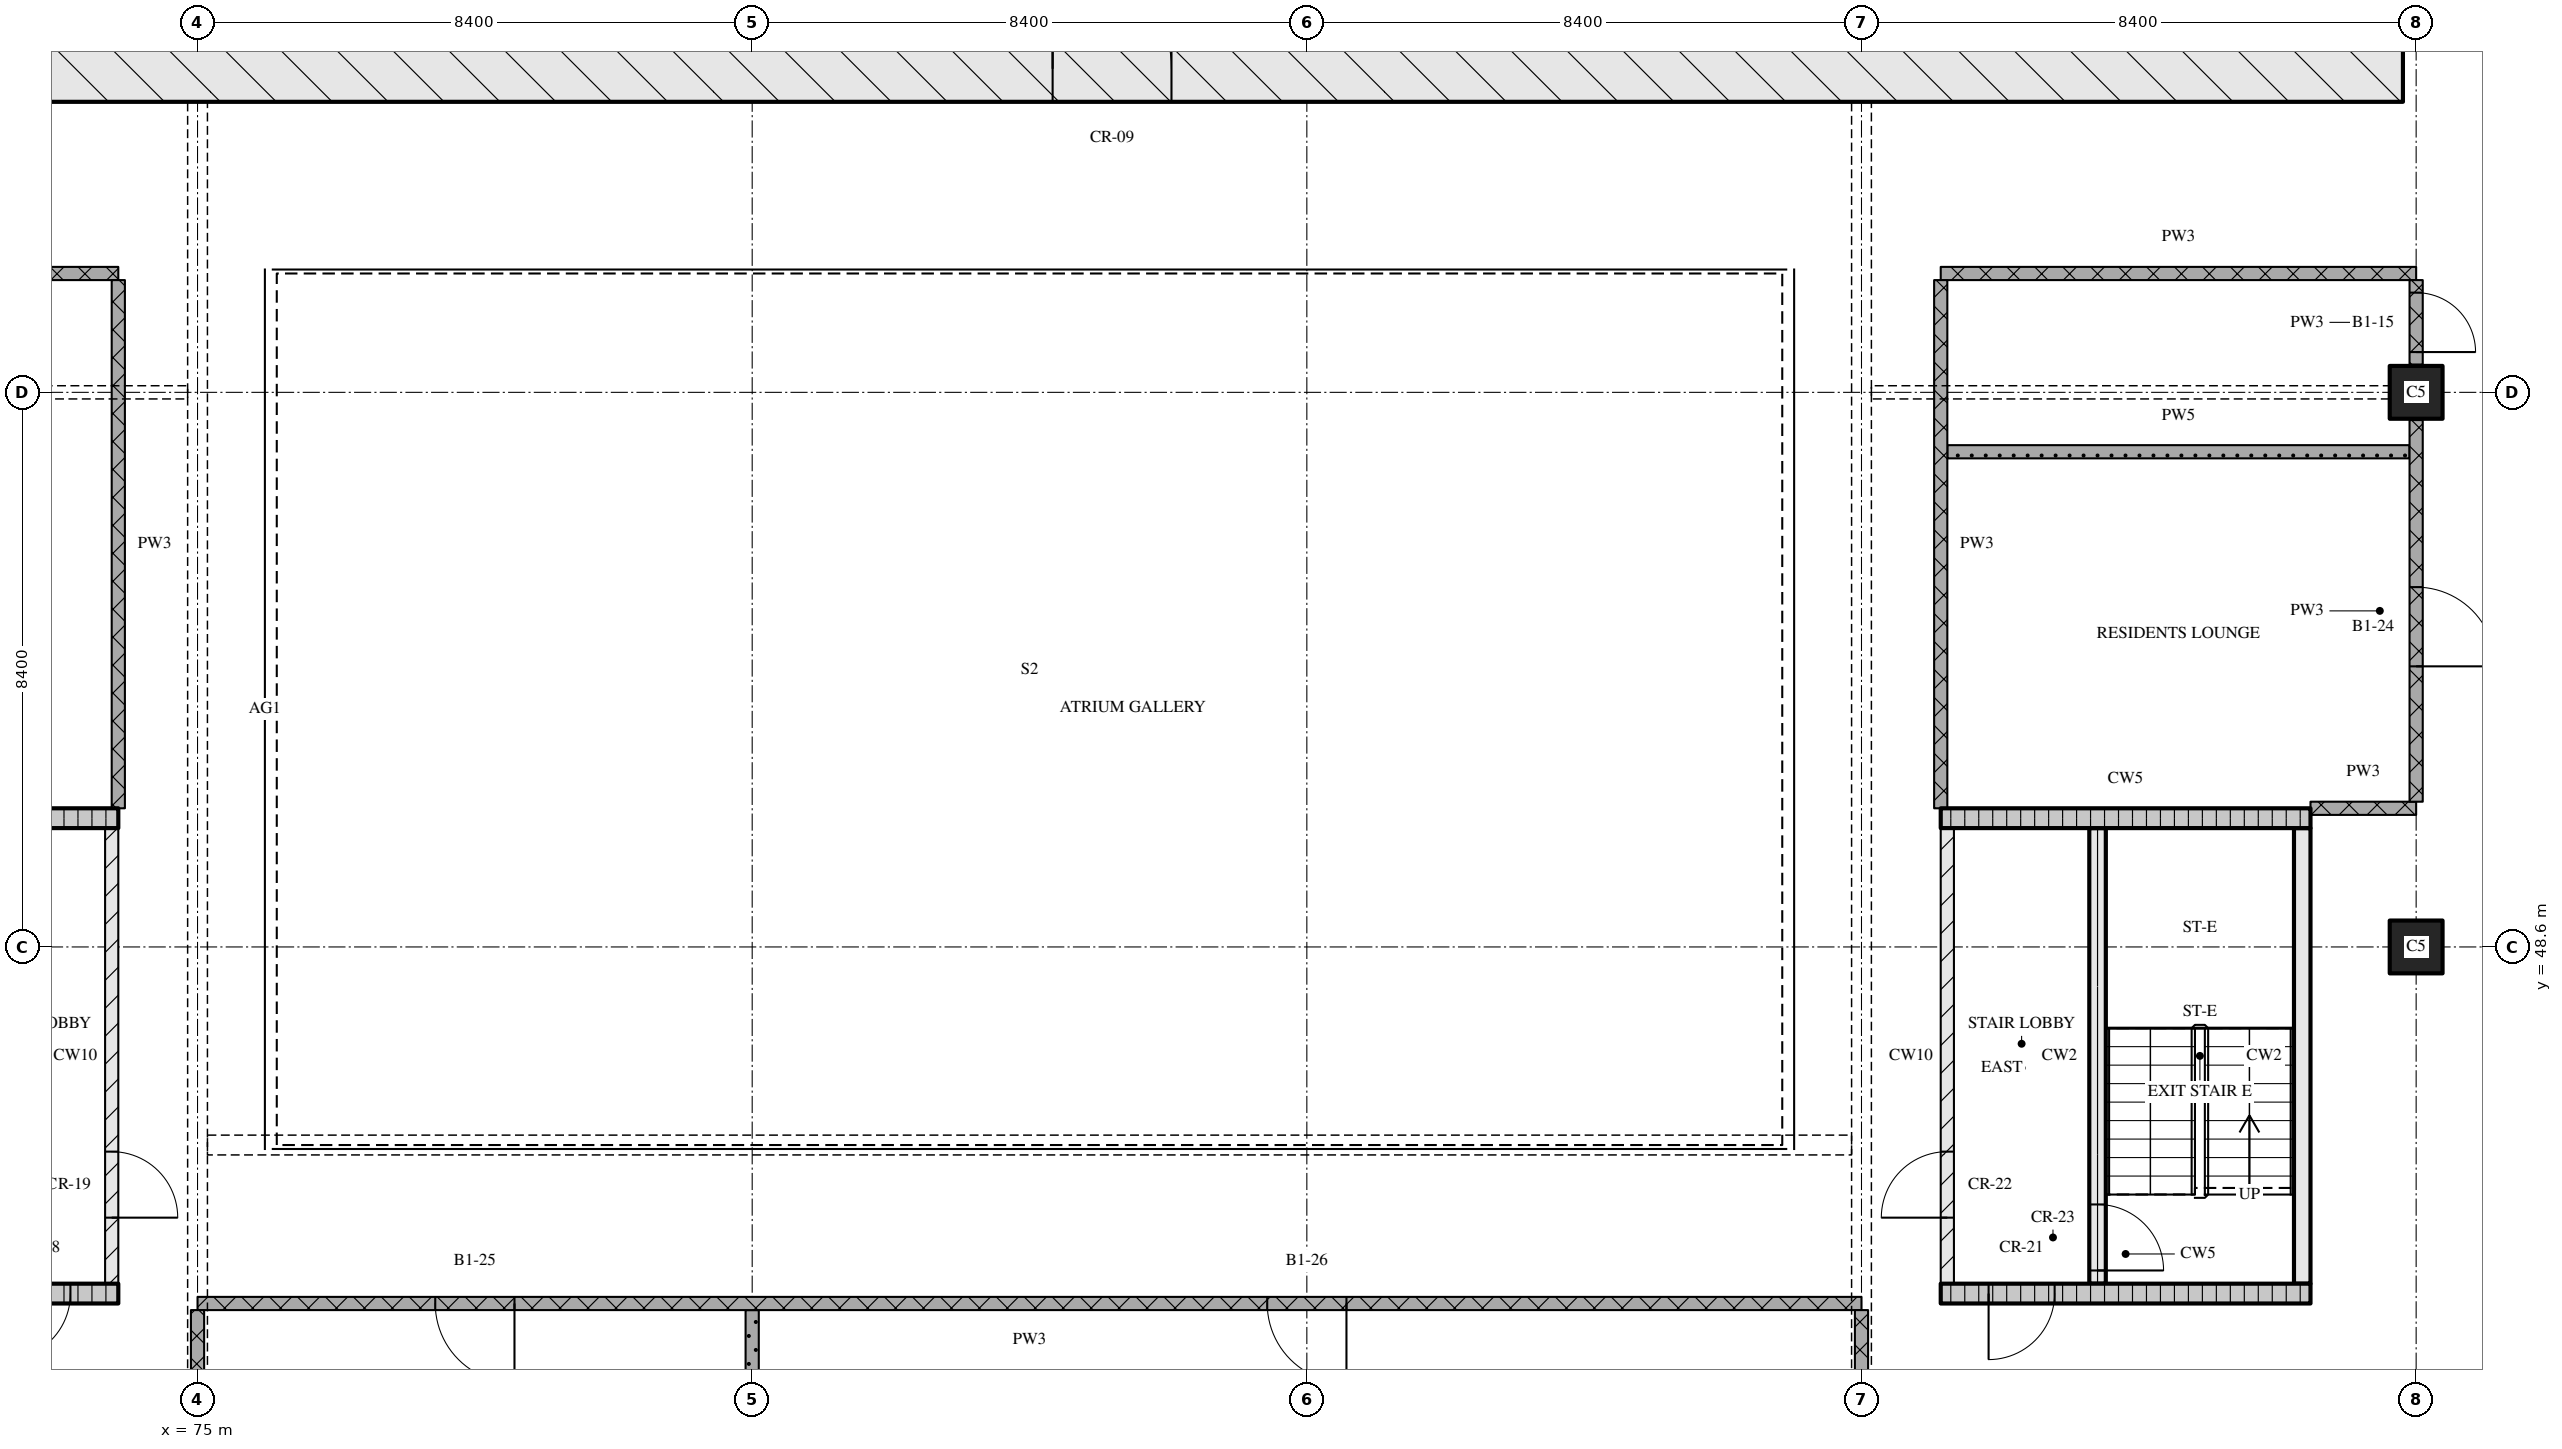
"""IFC4 building model, lengths in metres.
Left out: names, types, materials, properties, quantities, classifications, styles, units other than length and angle.
Written with IfcOpenShell. Run it as: python <this file> out.ifc"""

import sys

from ifc_helpers import new_model, si_unit, direction, frame, frame_2d, origin, origin_2d, place, context, subcontext, project, spatial, rectangle, extrude, element, fill, save


model = new_model("IFC4")
c1 = context("Model", 3, precision=1e-05, world=origin(), true_north=direction((0.0, 1.0)))
c2 = subcontext(c1, "Body", "Model", "MODEL_VIEW")
j1 = project(units=[si_unit("LENGTHUNIT", "METRE"), si_unit("PLANEANGLEUNIT", "RADIAN")], contexts=[c1])
p1 = place(None, origin())
s1 = spatial("IfcSite", under=j1, at=p1, CompositionType="ELEMENT")
p2 = place(p1, origin())
s2 = spatial("IfcBuilding", under=s1, at=p2, CompositionType="ELEMENT")
p3 = place(p2, frame((0.0, 0.0, 102.45)))
s3 = spatial("IfcBuildingStorey", under=s2, at=p3, CompositionType="ELEMENT", Elevation=102.45)
for number, where, z_axis, x_axis in (
    (1, (108.6, 48.6, 0.0), (0.0, 0.0, 1.0), (1.0, 0.0, 0.0)),
    (2, (108.6, 57.0, 0.0), (0.0, 0.0, 1.0), (1.0, 0.0, 0.0)),
):
    element("IfcColumn", number, at=place(p3, frame(where, z_axis=z_axis, x_axis=x_axis)), inside=s3, PredefinedType="COLUMN", context=c2, shape_type="SweptSolid", body=[
        extrude(rectangle(XDim=0.8, YDim=0.8, at=origin_2d()), origin(), (0.0, 0.0, 1.0), 3.6),
    ])
p4 = place(p3, frame((66.8, 61.9, 0.0), z_axis=(0.0, 0.0, 1.0), x_axis=(1.0, 0.0, 0.0)))
e3 = element("IfcWall", 3, at=p4, inside=s3, PredefinedType="SOLIDWALL", context=c2, shape_type="SweptSolid", body=[
    extrude(rectangle(XDim=41.6, YDim=1.0, at=frame_2d((20.8, 0.0))), origin(), (0.0, 0.0, 1.0), 3.32),
])
p5 = place(p4, frame((21.15, 0.0, 0.0)))
e4 = element("IfcOpeningElement", 4, at=p5, cuts=e3, PredefinedType="OPENING", context=c2, shape_type="SweptSolid", body=[
    extrude(rectangle(XDim=1.8, YDim=2.1, at=frame_2d((0.9, 1.05))), frame((0.0, 0.51, 0.0), z_axis=(0.0, -1.0, 0.0), x_axis=(1.0, 0.0, 0.0)), (0.0, 0.0, 1.0), 1.02),
])
p6 = place(p3, frame((68.2, 43.35, 0.0), z_axis=(0.0, 0.0, 1.0), x_axis=(1.0, 0.0, 0.0)))
e5 = element("IfcWall", 5, at=p6, inside=s3, PredefinedType="SOLIDWALL", context=c2, shape_type="SweptSolid", body=[
    extrude(rectangle(XDim=5.6, YDim=0.3, at=frame_2d((2.8, 0.0))), origin(), (0.0, 0.0, 1.0), 3.32),
])
p7 = place(p6, frame((3.875, 0.0, 0.0)))
e6 = element("IfcOpeningElement", 6, at=p7, cuts=e5, PredefinedType="OPENING", context=c2, shape_type="SweptSolid", body=[
    extrude(rectangle(XDim=1.0, YDim=2.1, at=frame_2d((0.5, 1.05))), frame((0.0, 0.16, 0.0), z_axis=(0.0, -1.0, 0.0), x_axis=(1.0, 0.0, 0.0)), (0.0, 0.0, 1.0), 0.32),
])
p8 = place(p3, frame((73.7, 43.5, 0.0), z_axis=(0.0, 0.0, 1.0), x_axis=(0.0, 1.0, 0.0)))
e7 = element("IfcWall", 7, at=p8, inside=s3, PredefinedType="PARTITIONING", context=c2, shape_type="SweptSolid", body=[
    extrude(rectangle(XDim=6.9, YDim=0.2, at=frame_2d((3.45, 0.0))), origin(), (0.0, 0.0, 1.0), 3.32),
])
p9 = place(p8, frame((1.0, 0.0, 0.0)))
e8 = element("IfcOpeningElement", 8, at=p9, cuts=e7, PredefinedType="OPENING", context=c2, shape_type="SweptSolid", body=[
    extrude(rectangle(XDim=1.0, YDim=2.1, at=frame_2d((0.5, 1.05))), frame((0.0, 0.11, 0.0), z_axis=(0.0, -1.0, 0.0), x_axis=(1.0, 0.0, 0.0)), (0.0, 0.0, 1.0), 0.22),
])
p10 = place(p3, frame((68.2, 50.55, 0.0), z_axis=(0.0, 0.0, 1.0), x_axis=(1.0, 0.0, 0.0)))
e9 = element("IfcWall", 9, at=p10, inside=s3, PredefinedType="SOLIDWALL", context=c2, shape_type="SweptSolid", body=[
    extrude(rectangle(XDim=5.6, YDim=0.3, at=frame_2d((2.8, 0.0))), origin(), (0.0, 0.0, 1.0), 3.32),
])
p11 = place(p3, frame((101.4, 43.35, 0.0), z_axis=(0.0, 0.0, 1.0), x_axis=(1.0, 0.0, 0.0)))
e10 = element("IfcWall", 10, at=p11, inside=s3, PredefinedType="SOLIDWALL", context=c2, shape_type="SweptSolid", body=[
    extrude(rectangle(XDim=5.6, YDim=0.3, at=frame_2d((2.8, 0.0))), origin(), (0.0, 0.0, 1.0), 3.32),
])
p12 = place(p11, frame((0.725, 0.0, 0.0)))
e11 = element("IfcOpeningElement", 11, at=p12, cuts=e10, PredefinedType="OPENING", context=c2, shape_type="SweptSolid", body=[
    extrude(rectangle(XDim=1.0, YDim=2.1, at=frame_2d((0.5, 1.05))), frame((0.0, 0.16, 0.0), z_axis=(0.0, -1.0, 0.0), x_axis=(1.0, 0.0, 0.0)), (0.0, 0.0, 1.0), 0.32),
])
p13 = place(p3, frame((101.5, 43.5, 0.0), z_axis=(0.0, 0.0, 1.0), x_axis=(0.0, 1.0, 0.0)))
e12 = element("IfcWall", 12, at=p13, inside=s3, PredefinedType="PARTITIONING", context=c2, shape_type="SweptSolid", body=[
    extrude(rectangle(XDim=6.9, YDim=0.2, at=frame_2d((3.45, 0.0))), origin(), (0.0, 0.0, 1.0), 3.32),
])
p14 = place(p13, frame((1.0, 0.0, 0.0)))
e13 = element("IfcOpeningElement", 13, at=p14, cuts=e12, PredefinedType="OPENING", context=c2, shape_type="SweptSolid", body=[
    extrude(rectangle(XDim=1.0, YDim=2.1, at=frame_2d((0.5, 1.05))), frame((0.0, 0.11, 0.0), z_axis=(0.0, -1.0, 0.0), x_axis=(1.0, 0.0, 0.0)), (0.0, 0.0, 1.0), 0.22),
])
p15 = place(p3, frame((103.775, 43.5, 0.0), z_axis=(0.0, 0.0, 1.0), x_axis=(0.0, 1.0, 0.0)))
e14 = element("IfcWall", 14, at=p15, inside=s3, PredefinedType="SOLIDWALL", context=c2, shape_type="SweptSolid", body=[
    extrude(rectangle(XDim=6.9, YDim=0.25, at=frame_2d((3.45, 0.0))), origin(), (0.0, 0.0, 1.0), 3.32),
])
p16 = place(p15, frame((0.2, 0.0, 0.0)))
e15 = element("IfcOpeningElement", 15, at=p16, cuts=e14, PredefinedType="OPENING", context=c2, shape_type="SweptSolid", body=[
    extrude(rectangle(XDim=1.0, YDim=2.1, at=frame_2d((0.5, 1.05))), frame((0.0, 0.135, 0.0), z_axis=(0.0, -1.0, 0.0), x_axis=(1.0, 0.0, 0.0)), (0.0, 0.0, 1.0), 0.27),
])
p17 = place(p3, frame((106.875, 43.5, 0.0), z_axis=(0.0, 0.0, 1.0), x_axis=(0.0, 1.0, 0.0)))
e16 = element("IfcWall", 16, at=p17, inside=s3, PredefinedType="SOLIDWALL", context=c2, shape_type="SweptSolid", body=[
    extrude(rectangle(XDim=6.9, YDim=0.25, at=frame_2d((3.45, 0.0))), origin(), (0.0, 0.0, 1.0), 3.32),
])
p18 = place(p3, frame((101.4, 50.55, 0.0), z_axis=(0.0, 0.0, 1.0), x_axis=(1.0, 0.0, 0.0)))
e17 = element("IfcWall", 17, at=p18, inside=s3, PredefinedType="SOLIDWALL", context=c2, shape_type="SweptSolid", body=[
    extrude(rectangle(XDim=5.6, YDim=0.3, at=frame_2d((2.8, 0.0))), origin(), (0.0, 0.0, 1.0), 3.32),
])
p19 = place(p3, frame((100.2, 43.2, 0.0), z_axis=(0.0, 0.0, 1.0), x_axis=(-1.0, 0.0, 0.0)))
e18 = element("IfcWall", 18, at=p19, inside=s3, PredefinedType="PARTITIONING", context=c2, shape_type="SweptSolid", body=[
    extrude(rectangle(XDim=25.2, YDim=0.2, at=frame_2d((12.6, 0.0))), origin(), (0.0, 0.0, 1.0), 3.32),
])
p20 = place(p19, frame((7.8, 0.0, 0.0)))
e19 = element("IfcOpeningElement", 19, at=p20, cuts=e18, PredefinedType="OPENING", context=c2, shape_type="SweptSolid", body=[
    extrude(rectangle(XDim=1.2, YDim=2.1, at=frame_2d((0.6, 1.05))), frame((0.0, 0.11, 0.0), z_axis=(0.0, -1.0, 0.0), x_axis=(1.0, 0.0, 0.0)), (0.0, 0.0, 1.0), 0.22),
])
p21 = place(p19, frame((20.4, 0.0, 0.0)))
e20 = element("IfcOpeningElement", 20, at=p21, cuts=e18, PredefinedType="OPENING", context=c2, shape_type="SweptSolid", body=[
    extrude(rectangle(XDim=1.2, YDim=2.1, at=frame_2d((0.6, 1.05))), frame((0.0, 0.11, 0.0), z_axis=(0.0, -1.0, 0.0), x_axis=(1.0, 0.0, 0.0)), (0.0, 0.0, 1.0), 0.22),
])
p22 = place(p3, frame((107.0, 50.7, 0.0), z_axis=(0.0, 0.0, 1.0), x_axis=(1.0, 0.0, 0.0)))
e21 = element("IfcWall", 21, at=p22, inside=s3, PredefinedType="PARTITIONING", context=c2, shape_type="SweptSolid", body=[
    extrude(rectangle(XDim=1.6, YDim=0.2, at=frame_2d((0.8, 0.0))), origin(), (0.0, 0.0, 1.0), 3.32),
])
p23 = place(p3, frame((101.5, 56.1, 0.0), z_axis=(0.0, 0.0, 1.0), x_axis=(1.0, 0.0, 0.0)))
e22 = element("IfcWall", 22, at=p23, inside=s3, PredefinedType="PARTITIONING", context=c2, shape_type="SweptSolid", body=[
    extrude(rectangle(XDim=7.0, YDim=0.2, at=frame_2d((3.5, 0.0))), origin(), (0.0, 0.0, 1.0), 3.32),
])
p24 = place(p3, frame((73.8, 58.8, 0.0), z_axis=(0.0, 0.0, 1.0), x_axis=(-1.0, 0.0, 0.0)))
e23 = element("IfcWall", 23, at=p24, inside=s3, PredefinedType="PARTITIONING", context=c2, shape_type="SweptSolid", body=[
    extrude(rectangle(XDim=7.2, YDim=0.2, at=frame_2d((3.6, 0.0))), origin(), (0.0, 0.0, 1.0), 3.32),
])
p25 = place(p24, frame((3.0, 0.0, 0.0)))
e24 = element("IfcOpeningElement", 24, at=p25, cuts=e23, PredefinedType="OPENING", context=c2, shape_type="SweptSolid", body=[
    extrude(rectangle(XDim=1.2, YDim=2.1, at=frame_2d((0.6, 1.05))), frame((0.0, 0.11, 0.0), z_axis=(0.0, -1.0, 0.0), x_axis=(1.0, 0.0, 0.0)), (0.0, 0.0, 1.0), 0.22),
])
p26 = place(p3, frame((101.4, 58.8, 0.0), z_axis=(0.0, 0.0, 1.0), x_axis=(1.0, 0.0, 0.0)))
e25 = element("IfcWall", 25, at=p26, inside=s3, PredefinedType="PARTITIONING", context=c2, shape_type="SweptSolid", body=[
    extrude(rectangle(XDim=7.2, YDim=0.2, at=frame_2d((3.6, 0.0))), origin(), (0.0, 0.0, 1.0), 3.32),
])
p27 = place(p3, frame((73.8, 58.7, 0.0), z_axis=(0.0, 0.0, 1.0), x_axis=(0.0, -1.0, 0.0)))
e26 = element("IfcWall", 26, at=p27, inside=s3, PredefinedType="PARTITIONING", context=c2, shape_type="SweptSolid", body=[
    extrude(rectangle(XDim=8.0, YDim=0.2, at=frame_2d((4.0, 0.0))), origin(), (0.0, 0.0, 1.0), 3.32),
])
p28 = place(p3, frame((75.0, 43.1, 0.0), z_axis=(0.0, 0.0, 1.0), x_axis=(0.0, -1.0, 0.0)))
e27 = element("IfcWall", 27, at=p28, inside=s3, PredefinedType="PARTITIONING", context=c2, shape_type="SweptSolid", body=[
    extrude(rectangle(XDim=2.2, YDim=0.2, at=frame_2d((1.1, 0.0))), origin(), (0.0, 0.0, 1.0), 2.43),
])
p29 = place(p3, frame((83.4, 43.1, 0.0), z_axis=(0.0, 0.0, 1.0), x_axis=(0.0, -1.0, 0.0)))
e28 = element("IfcWall", 28, at=p29, inside=s3, PredefinedType="PARTITIONING", context=c2, shape_type="SweptSolid", body=[
    extrude(rectangle(XDim=2.48, YDim=0.2, at=frame_2d((1.24, 0.0))), origin(), (0.0, 0.0, 1.0), 3.32),
])
p30 = place(p3, frame((100.2, 43.1, 0.0), z_axis=(0.0, 0.0, 1.0), x_axis=(0.0, -1.0, 0.0)))
e29 = element("IfcWall", 29, at=p30, inside=s3, PredefinedType="PARTITIONING", context=c2, shape_type="SweptSolid", body=[
    extrude(rectangle(XDim=2.2, YDim=0.2, at=frame_2d((1.1, 0.0))), origin(), (0.0, 0.0, 1.0), 2.43),
])
p31 = place(p3, frame((101.4, 58.7, 0.0), z_axis=(0.0, 0.0, 1.0), x_axis=(0.0, -1.0, 0.0)))
e30 = element("IfcWall", 30, at=p31, inside=s3, PredefinedType="PARTITIONING", context=c2, shape_type="SweptSolid", body=[
    extrude(rectangle(XDim=8.0, YDim=0.2, at=frame_2d((4.0, 0.0))), origin(), (0.0, 0.0, 1.0), 3.32),
])
p32 = place(p3, frame((108.6, 50.8, 0.0), z_axis=(0.0, 0.0, 1.0), x_axis=(0.0, 1.0, 0.0)))
e31 = element("IfcWall", 31, at=p32, inside=s3, PredefinedType="PARTITIONING", context=c2, shape_type="SweptSolid", body=[
    extrude(rectangle(XDim=5.78, YDim=0.2, at=frame_2d((2.89, 0.0))), origin(), (0.0, 0.0, 1.0), 3.32),
])
p33 = place(p32, frame((2.05, 0.0, 0.0)))
e32 = element("IfcOpeningElement", 32, at=p33, cuts=e31, PredefinedType="OPENING", context=c2, shape_type="SweptSolid", body=[
    extrude(rectangle(XDim=1.2, YDim=2.1, at=frame_2d((0.6, 1.05))), frame((0.0, 0.11, 0.0), z_axis=(0.0, -1.0, 0.0), x_axis=(1.0, 0.0, 0.0)), (0.0, 0.0, 1.0), 0.22),
])
p34 = place(p3, frame((108.6, 57.42, 0.0), z_axis=(0.0, 0.0, 1.0), x_axis=(0.0, 1.0, 0.0)))
e33 = element("IfcWall", 33, at=p34, inside=s3, PredefinedType="PARTITIONING", context=c2, shape_type="SweptSolid", body=[
    extrude(rectangle(XDim=1.28, YDim=0.2, at=frame_2d((0.64, 0.0))), origin(), (0.0, 0.0, 1.0), 3.32),
])
p35 = place(p34, frame((0.19, 0.0, 0.0)))
e34 = element("IfcOpeningElement", 34, at=p35, cuts=e33, PredefinedType="OPENING", context=c2, shape_type="SweptSolid", body=[
    extrude(rectangle(XDim=0.9, YDim=2.1, at=frame_2d((0.45, 1.05))), frame((0.0, 0.11, 0.0), z_axis=(0.0, -1.0, 0.0), x_axis=(1.0, 0.0, 0.0)), (0.0, 0.0, 1.0), 0.22),
])
p36 = place(p5, origin())
e35 = element("IfcDoor", 35, at=p36, inside=s3, OperationType="DOUBLE_DOOR_SINGLE_SWING", PredefinedType="DOOR", context=c2, shape_type="SweptSolid", body=[
    extrude(rectangle(XDim=1.8, YDim=2.1, at=frame_2d((0.9, 1.05))), frame((0.0, 0.025, 0.0), z_axis=(0.0, -1.0, 0.0), x_axis=(1.0, 0.0, 0.0)), (0.0, 0.0, 1.0), 0.05),
])
fill(e4, e35)
p37 = place(p7, origin())
e36 = element("IfcDoor", 36, at=p37, inside=s3, OperationType="SINGLE_SWING_RIGHT", PredefinedType="DOOR", context=c2, shape_type="SweptSolid", body=[
    extrude(rectangle(XDim=1.0, YDim=2.1, at=frame_2d((0.5, 1.05))), frame((0.0, 0.025, 0.0), z_axis=(0.0, -1.0, 0.0), x_axis=(1.0, 0.0, 0.0)), (0.0, 0.0, 1.0), 0.05),
])
fill(e6, e36)
p38 = place(p9, origin())
e37 = element("IfcDoor", 37, at=p38, inside=s3, OperationType="SINGLE_SWING_RIGHT", PredefinedType="DOOR", context=c2, shape_type="SweptSolid", body=[
    extrude(rectangle(XDim=1.0, YDim=2.1, at=frame_2d((0.5, 1.05))), frame((0.0, 0.025, 0.0), z_axis=(0.0, -1.0, 0.0), x_axis=(1.0, 0.0, 0.0)), (0.0, 0.0, 1.0), 0.05),
])
fill(e8, e37)
p39 = place(p12, origin())
e38 = element("IfcDoor", 38, at=p39, inside=s3, OperationType="SINGLE_SWING_RIGHT", PredefinedType="DOOR", context=c2, shape_type="SweptSolid", body=[
    extrude(rectangle(XDim=1.0, YDim=2.1, at=frame_2d((0.5, 1.05))), frame((0.0, 0.025, 0.0), z_axis=(0.0, -1.0, 0.0), x_axis=(1.0, 0.0, 0.0)), (0.0, 0.0, 1.0), 0.05),
])
fill(e11, e38)
p40 = place(p16, origin())
e39 = element("IfcDoor", 39, at=p40, inside=s3, OperationType="SINGLE_SWING_RIGHT", PredefinedType="DOOR", context=c2, shape_type="SweptSolid", body=[
    extrude(rectangle(XDim=1.0, YDim=2.1, at=frame_2d((0.5, 1.05))), frame((0.0, 0.025, 0.0), z_axis=(0.0, -1.0, 0.0), x_axis=(1.0, 0.0, 0.0)), (0.0, 0.0, 1.0), 0.05),
])
fill(e15, e39)
p41 = place(p14, origin())
e40 = element("IfcDoor", 40, at=p41, inside=s3, OperationType="SINGLE_SWING_LEFT", PredefinedType="DOOR", context=c2, shape_type="SweptSolid", body=[
    extrude(rectangle(XDim=1.0, YDim=2.1, at=frame_2d((0.5, 1.05))), frame((0.0, 0.025, 0.0), z_axis=(0.0, -1.0, 0.0), x_axis=(1.0, 0.0, 0.0)), (0.0, 0.0, 1.0), 0.05),
])
fill(e13, e40)
p42 = place(p20, origin())
e41 = element("IfcDoor", 41, at=p42, inside=s3, OperationType="SINGLE_SWING_LEFT", PredefinedType="DOOR", context=c2, shape_type="SweptSolid", body=[
    extrude(rectangle(XDim=1.2, YDim=2.1, at=frame_2d((0.6, 1.05))), frame((0.0, 0.025, 0.0), z_axis=(0.0, -1.0, 0.0), x_axis=(1.0, 0.0, 0.0)), (0.0, 0.0, 1.0), 0.05),
])
fill(e19, e41)
p43 = place(p21, origin())
e42 = element("IfcDoor", 42, at=p43, inside=s3, OperationType="SINGLE_SWING_LEFT", PredefinedType="DOOR", context=c2, shape_type="SweptSolid", body=[
    extrude(rectangle(XDim=1.2, YDim=2.1, at=frame_2d((0.6, 1.05))), frame((0.0, 0.025, 0.0), z_axis=(0.0, -1.0, 0.0), x_axis=(1.0, 0.0, 0.0)), (0.0, 0.0, 1.0), 0.05),
])
fill(e20, e42)
p44 = place(p33, origin())
e43 = element("IfcDoor", 43, at=p44, inside=s3, OperationType="SINGLE_SWING_RIGHT", PredefinedType="DOOR", context=c2, shape_type="SweptSolid", body=[
    extrude(rectangle(XDim=1.2, YDim=2.1, at=frame_2d((0.6, 1.05))), frame((0.0, 0.025, 0.0), z_axis=(0.0, -1.0, 0.0), x_axis=(1.0, 0.0, 0.0)), (0.0, 0.0, 1.0), 0.05),
])
fill(e32, e43)
p45 = place(p35, origin())
e44 = element("IfcDoor", 44, at=p45, inside=s3, OperationType="SINGLE_SWING_RIGHT", PredefinedType="DOOR", context=c2, shape_type="SweptSolid", body=[
    extrude(rectangle(XDim=0.9, YDim=2.1, at=frame_2d((0.45, 1.05))), frame((0.0, 0.025, 0.0), z_axis=(0.0, -1.0, 0.0), x_axis=(1.0, 0.0, 0.0)), (0.0, 0.0, 1.0), 0.05),
])
fill(e34, e44)
save(model, sys.argv[1])
